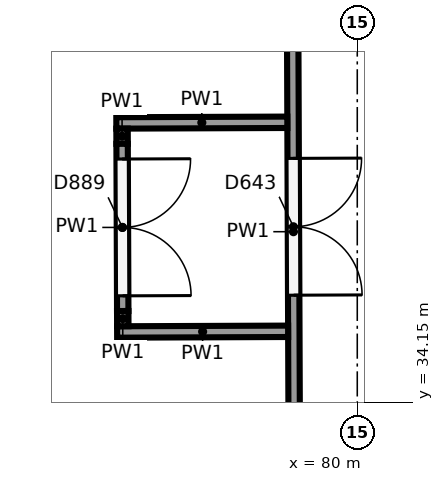
"""IFC4 building model, lengths in metres.
Left out: names, types, materials, properties, quantities, classifications, styles, units other than length and angle.
Written with IfcOpenShell. Run it as: python <this file> out.ifc"""

import sys

from ifc_helpers import new_model, si_unit, direction, frame, frame_2d, origin, place, context, subcontext, project, spatial, rectangle, extrude, element, fill, save


model = new_model("IFC4")
c1 = context("Model", 3, precision=1e-05, world=origin(), true_north=direction((0.0, 1.0)))
c2 = subcontext(c1, "Body", "Model", "MODEL_VIEW")
j1 = project(units=[si_unit("LENGTHUNIT", "METRE"), si_unit("PLANEANGLEUNIT", "RADIAN")], contexts=[c1])
p1 = place(None, origin())
s1 = spatial("IfcSite", under=j1, at=p1, CompositionType="ELEMENT")
p2 = place(p1, origin())
s2 = spatial("IfcBuilding", under=s1, at=p2, CompositionType="ELEMENT")
p3 = place(p2, frame((0.0, 0.0, 6.5)))
s3 = spatial("IfcBuildingStorey", under=s2, at=p3, CompositionType="ELEMENT", Elevation=6.5)
p4 = place(p3, frame((79.14, 41.81, 0.0), z_axis=(0.0, 0.0, 1.0), x_axis=(0.003787424647, -0.999992827682, 0.0)))
e1 = element("IfcWall", 1, at=p4, inside=s3, PredefinedType="PARTITIONING", context=c2, shape_type="SweptSolid", body=[
    extrude(rectangle(XDim=10.829, YDim=0.15, at=frame_2d((5.415, 0.0))), origin(), (0.0, 0.0, 1.0), 5.15),
])
p5 = place(p4, frame((4.45, 0.0, 0.0)))
e2 = element("IfcOpeningElement", 2, at=p5, cuts=e1, PredefinedType="OPENING", context=c2, shape_type="SweptSolid", body=[
    extrude(rectangle(XDim=1.8, YDim=2.1, at=frame_2d((0.9, 1.05))), frame((0.0, 0.085, 0.0), z_axis=(0.0, -1.0, 0.0), x_axis=(1.0, 0.0, 0.0)), (0.0, 0.0, 1.0), 0.17),
])
for number, where, z_axis, x_axis in (
    (3, (79.08, 37.835, 0.0), (0.0, 0.0, 1.0), (-1.0, -0.004, 0.0)),
    (4, (79.09, 35.085, 0.0), (0.0, 0.0, 1.0), (-1.0, -0.004, 0.0)),
):
    element("IfcWall", number, at=place(p3, frame(where, z_axis=z_axis, x_axis=x_axis)), inside=s3, PredefinedType="PARTITIONING", context=c2, shape_type="SweptSolid", body=[
        extrude(rectangle(XDim=2.25, YDim=0.15, at=frame_2d((1.125, 0.0))), origin(), (0.0, 0.0, 1.0), 5.15),
    ])
p6 = place(p3, frame((76.905, 37.751, 0.0), z_axis=(0.0, 0.0, 1.0), x_axis=(0.004883946635, -0.999988073462, 0.0)))
e5 = element("IfcWall", 5, at=p6, inside=s3, PredefinedType="PARTITIONING", context=c2, shape_type="SweptSolid", body=[
    extrude(rectangle(XDim=0.2, YDim=0.15, at=frame_2d((0.1, 0.0))), origin(), (0.0, 0.0, 1.0), 5.15),
])
p7 = place(p3, frame((76.906, 37.552, 0.0), z_axis=(0.0, 0.0, 1.0), x_axis=(0.003773139272, -0.999992881685, 0.0)))
e6 = element("IfcWall", 6, at=p7, inside=s3, PredefinedType="PARTITIONING", context=c2, shape_type="SweptSolid", body=[
    extrude(rectangle(XDim=2.2, YDim=0.15, at=frame_2d((1.1, 0.0))), origin(), (0.0, 0.0, 1.0), 5.15),
])
p8 = place(p7, frame((0.2, 0.0, 0.0)))
e7 = element("IfcOpeningElement", 7, at=p8, cuts=e6, PredefinedType="OPENING", context=c2, shape_type="SweptSolid", body=[
    extrude(rectangle(XDim=1.8, YDim=2.1, at=frame_2d((0.9, 1.05))), frame((0.0, 0.085, 0.0), z_axis=(0.0, -1.0, 0.0), x_axis=(1.0, 0.0, 0.0)), (0.0, 0.0, 1.0), 0.17),
])
p9 = place(p3, frame((76.914, 35.352, 0.0), z_axis=(0.0, 0.0, 1.0), x_axis=(0.003662979089, -0.99999329127, 0.0)))
e8 = element("IfcWall", 8, at=p9, inside=s3, PredefinedType="PARTITIONING", context=c2, shape_type="SweptSolid", body=[
    extrude(rectangle(XDim=0.2, YDim=0.15, at=frame_2d((0.1, 0.0))), origin(), (0.0, 0.0, 1.0), 5.15),
])
p10 = place(p5, origin())
e9 = element("IfcDoor", 9, at=p10, inside=s3, OperationType="DOUBLE_DOOR_SINGLE_SWING", PredefinedType="DOOR", context=c2, shape_type="SweptSolid", body=[
    extrude(rectangle(XDim=1.8, YDim=2.1, at=frame_2d((0.9, 1.05))), frame((0.0, 0.025, 0.0), z_axis=(0.0, -1.0, 0.0), x_axis=(1.0, 0.0, 0.0)), (0.0, 0.0, 1.0), 0.05),
])
fill(e2, e9)
p11 = place(p8, origin())
e10 = element("IfcDoor", 10, at=p11, inside=s3, OperationType="DOUBLE_DOOR_SINGLE_SWING", PredefinedType="DOOR", context=c2, shape_type="SweptSolid", body=[
    extrude(rectangle(XDim=1.8, YDim=2.1, at=frame_2d((0.9, 1.05))), frame((0.0, 0.025, 0.0), z_axis=(0.0, -1.0, 0.0), x_axis=(1.0, 0.0, 0.0)), (0.0, 0.0, 1.0), 0.05),
])
fill(e7, e10)
save(model, sys.argv[1])
